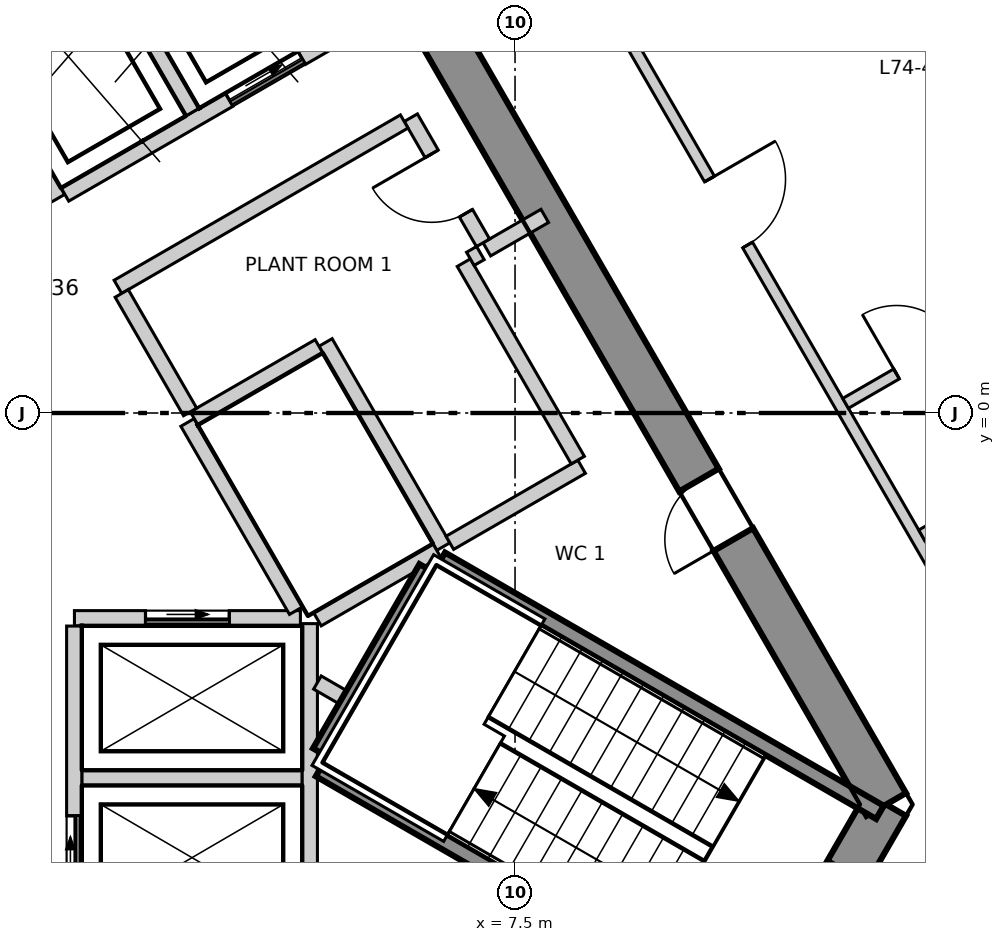
"""IFC4 building model, lengths in metres.
Left out: names, types, materials, properties, quantities, classifications, styles, units other than length and angle.
Written with IfcOpenShell. Run it as: python <this file> out.ifc"""

import sys

from ifc_helpers import new_model, si_unit, direction, frame, frame_2d, origin, place, context, subcontext, project, spatial, polyline, rectangle, outline, extrude, element, fill, save


model = new_model("IFC4")
c1 = context("Model", 3, precision=1e-05, world=origin(), true_north=direction((0.0, 1.0)))
c2 = subcontext(c1, "Body", "Model", "MODEL_VIEW")
j1 = project(units=[si_unit("LENGTHUNIT", "METRE"), si_unit("PLANEANGLEUNIT", "RADIAN")], contexts=[c1])
p1 = place(None, origin())
s1 = spatial("IfcSite", under=j1, at=p1, CompositionType="ELEMENT")
p2 = place(p1, origin())
s2 = spatial("IfcBuilding", under=s1, at=p2, CompositionType="ELEMENT")
p3 = place(p2, frame((0.0, 0.0, 311.5)))
s3 = spatial("IfcBuildingStorey", under=s2, at=p3, CompositionType="ELEMENT", Elevation=311.5)
p4 = place(p3, frame((10.652, -8.15, -0.3), z_axis=(0.0, 0.0, 1.0), x_axis=(0.49997462182, 0.866040055388, 0.0)))
e1 = element("IfcWall", 1, at=p4, inside=s3, PredefinedType="SHEAR", context=c2, shape_type="SweptSolid", body=[
    extrude(outline(polyline([(-0.173, -0.3), (1.732, -0.301), (3.638, -0.301), (3.291, 0.3), (1.732, 0.3), (0.173, 0.3), (-0.173, -0.3)])), origin(), (0.0, 0.0, 1.0), 3.6),
])
p5 = place(p4, frame((1.032, 0.0, 0.3)))
e2 = element("IfcOpeningElement", 2, at=p5, cuts=e1, PredefinedType="OPENING", context=c2, shape_type="SweptSolid", body=[
    extrude(rectangle(XDim=1.4, YDim=2.1, at=frame_2d((0.7, 1.05))), frame((0.0, 0.31, 0.0), z_axis=(0.0, -1.0, 0.0), x_axis=(1.0, 0.0, 0.0)), (0.0, 0.0, 1.0), 0.621),
])
p6 = place(p3, frame((12.384, -5.15, -0.3), z_axis=(0.0, 0.0, 1.0), x_axis=(-0.500000539815, 0.866025092122, 0.0)))
e3 = element("IfcWall", 3, at=p6, inside=s3, PredefinedType="SHEAR", context=c2, shape_type="SweptSolid", body=[
    extrude(outline(polyline([(-0.173, -0.301), (1.795, -0.301), (3.763, -0.301), (5.731, -0.301), (7.7, -0.301), (9.668, -0.301), (11.636, -0.301), (13.604, -0.3), (15.573, -0.3), (17.541, -0.3), (19.509, -0.3), (21.477, -0.3), (21.131, 0.3), (19.226, 0.3), (17.321, 0.3), (15.415, 0.3), (13.51, 0.3), (11.605, 0.3), (9.699, 0.3), (7.794, 0.3), (5.889, 0.3), (3.984, 0.3), (2.078, 0.3), (0.173, 0.3), (-0.173, -0.301)])), origin(), (0.0, 0.0, 1.0), 3.6),
])
p7 = place(p6, frame((16.378, 0.0, 0.3)))
e4 = element("IfcOpeningElement", 4, at=p7, cuts=e3, PredefinedType="OPENING", context=c2, shape_type="SweptSolid", body=[
    extrude(rectangle(XDim=0.9, YDim=2.1, at=frame_2d((0.45, 1.05))), frame((0.0, 0.31, 0.0), z_axis=(0.0, -1.0, 0.0), x_axis=(1.0, 0.0, 0.0)), (0.0, 0.0, 1.0), 0.621),
])
p8 = place(p6, frame((4.026, 0.0, 0.3)))
e5 = element("IfcOpeningElement", 5, at=p8, cuts=e3, PredefinedType="OPENING", context=c2, shape_type="SweptSolid", body=[
    extrude(rectangle(XDim=0.9, YDim=2.1, at=frame_2d((0.45, 1.05))), frame((0.0, 0.31, 0.0), z_axis=(0.0, -1.0, 0.0), x_axis=(1.0, 0.0, 0.0)), (0.0, 0.0, 1.0), 0.621),
])
p9 = place(p3, frame((24.544, -11.385, 0.0), z_axis=(0.0, 0.0, 1.0), x_axis=(-0.500002044679, 0.866024223285, 0.0)))
e6 = element("IfcWall", 6, at=p9, inside=s3, PredefinedType="ELEMENTEDWALL", context=c2, shape_type="SweptSolid", body=[
    extrude(rectangle(XDim=44.243, YDim=0.2, at=frame_2d((22.122, 0.0))), origin(), (0.0, 0.0, 1.0), 3.3),
])
p10 = place(p9, frame((2.056, 0.0, 0.9)))
e7 = element("IfcOpeningElement", 7, at=p10, cuts=e6, PredefinedType="OPENING", context=c2, shape_type="SweptSolid", body=[
    extrude(rectangle(XDim=3.7, YDim=2.2, at=frame_2d((1.85, 1.1))), frame((0.0, 0.11, 0.0), z_axis=(0.0, -1.0, 0.0), x_axis=(1.0, 0.0, 0.0)), (0.0, 0.0, 1.0), 0.22),
])
p11 = place(p9, frame((7.264, 0.0, 0.9)))
e8 = element("IfcOpeningElement", 8, at=p11, cuts=e6, PredefinedType="OPENING", context=c2, shape_type="SweptSolid", body=[
    extrude(rectangle(XDim=3.7, YDim=2.2, at=frame_2d((1.85, 1.1))), frame((0.0, 0.11, 0.0), z_axis=(0.0, -1.0, 0.0), x_axis=(1.0, 0.0, 0.0)), (0.0, 0.0, 1.0), 0.22),
])
p12 = place(p9, frame((12.471, 0.0, 0.9)))
e9 = element("IfcOpeningElement", 9, at=p12, cuts=e6, PredefinedType="OPENING", context=c2, shape_type="SweptSolid", body=[
    extrude(rectangle(XDim=3.7, YDim=2.2, at=frame_2d((1.85, 1.1))), frame((0.0, 0.11, 0.0), z_axis=(0.0, -1.0, 0.0), x_axis=(1.0, 0.0, 0.0)), (0.0, 0.0, 1.0), 0.22),
])
p13 = place(p9, frame((17.678, 0.0, 0.9)))
e10 = element("IfcOpeningElement", 10, at=p13, cuts=e6, PredefinedType="OPENING", context=c2, shape_type="SweptSolid", body=[
    extrude(rectangle(XDim=3.7, YDim=2.2, at=frame_2d((1.85, 1.1))), frame((0.0, 0.11, 0.0), z_axis=(0.0, -1.0, 0.0), x_axis=(1.0, 0.0, 0.0)), (0.0, 0.0, 1.0), 0.22),
])
p14 = place(p9, frame((22.885, 0.0, 0.9)))
e11 = element("IfcOpeningElement", 11, at=p14, cuts=e6, PredefinedType="OPENING", context=c2, shape_type="SweptSolid", body=[
    extrude(rectangle(XDim=3.7, YDim=2.2, at=frame_2d((1.85, 1.1))), frame((0.0, 0.11, 0.0), z_axis=(0.0, -1.0, 0.0), x_axis=(1.0, 0.0, 0.0)), (0.0, 0.0, 1.0), 0.22),
])
p15 = place(p9, frame((28.093, 0.0, 0.9)))
e12 = element("IfcOpeningElement", 12, at=p15, cuts=e6, PredefinedType="OPENING", context=c2, shape_type="SweptSolid", body=[
    extrude(rectangle(XDim=3.7, YDim=2.2, at=frame_2d((1.85, 1.1))), frame((0.0, 0.11, 0.0), z_axis=(0.0, -1.0, 0.0), x_axis=(1.0, 0.0, 0.0)), (0.0, 0.0, 1.0), 0.22),
])
p16 = place(p9, frame((33.3, 0.0, 0.9)))
e13 = element("IfcOpeningElement", 13, at=p16, cuts=e6, PredefinedType="OPENING", context=c2, shape_type="SweptSolid", body=[
    extrude(rectangle(XDim=3.7, YDim=2.2, at=frame_2d((1.85, 1.1))), frame((0.0, 0.11, 0.0), z_axis=(0.0, -1.0, 0.0), x_axis=(1.0, 0.0, 0.0)), (0.0, 0.0, 1.0), 0.22),
])
p17 = place(p9, frame((38.507, 0.0, 0.9)))
e14 = element("IfcOpeningElement", 14, at=p17, cuts=e6, PredefinedType="OPENING", context=c2, shape_type="SweptSolid", body=[
    extrude(rectangle(XDim=3.7, YDim=2.2, at=frame_2d((1.85, 1.1))), frame((0.0, 0.11, 0.0), z_axis=(0.0, -1.0, 0.0), x_axis=(1.0, 0.0, 0.0)), (0.0, 0.0, 1.0), 0.22),
])
p18 = place(p3, frame((0.075, 20.37, 0.0), z_axis=(0.0, 0.0, 1.0), x_axis=(0.500006672087, -0.866021551619, 0.0)))
e15 = element("IfcWall", 15, at=p18, inside=s3, PredefinedType="PARTITIONING", context=c2, shape_type="SweptSolid", body=[
    extrude(rectangle(XDim=35.27, YDim=0.15, at=frame_2d((17.635, 0.0))), origin(), (0.0, 0.0, 1.0), 3.3),
])
p19 = place(p18, frame((31.206, 0.0, 0.0)))
e16 = element("IfcOpeningElement", 16, at=p19, cuts=e15, PredefinedType="OPENING", context=c2, shape_type="SweptSolid", body=[
    extrude(rectangle(XDim=1.0, YDim=2.1, at=frame_2d((0.5, 1.05))), frame((0.0, 0.085, 0.0), z_axis=(0.0, -1.0, 0.0), x_axis=(1.0, 0.0, 0.0)), (0.0, 0.0, 1.0), 0.17),
])
p20 = place(p18, frame((19.968, 0.0, 0.0)))
e17 = element("IfcOpeningElement", 17, at=p20, cuts=e15, PredefinedType="OPENING", context=c2, shape_type="SweptSolid", body=[
    extrude(rectangle(XDim=1.0, YDim=2.1, at=frame_2d((0.5, 1.05))), frame((0.0, 0.085, 0.0), z_axis=(0.0, -1.0, 0.0), x_axis=(1.0, 0.0, 0.0)), (0.0, 0.0, 1.0), 0.17),
])
p21 = place(p18, frame((13.353, 0.0, 0.0)))
e18 = element("IfcOpeningElement", 18, at=p21, cuts=e15, PredefinedType="OPENING", context=c2, shape_type="SweptSolid", body=[
    extrude(rectangle(XDim=1.0, YDim=2.1, at=frame_2d((0.5, 1.05))), frame((0.0, 0.085, 0.0), z_axis=(0.0, -1.0, 0.0), x_axis=(1.0, 0.0, 0.0)), (0.0, 0.0, 1.0), 0.17),
])
p22 = place(p18, frame((7.746, 0.0, 0.0)))
e19 = element("IfcOpeningElement", 19, at=p22, cuts=e15, PredefinedType="OPENING", context=c2, shape_type="SweptSolid", body=[
    extrude(rectangle(XDim=1.0, YDim=2.1, at=frame_2d((0.5, 1.05))), frame((0.0, 0.085, 0.0), z_axis=(0.0, -1.0, 0.0), x_axis=(1.0, 0.0, 0.0)), (0.0, 0.0, 1.0), 0.17),
])
p23 = place(p18, frame((3.038, 0.0, 0.0)))
e20 = element("IfcOpeningElement", 20, at=p23, cuts=e15, PredefinedType="OPENING", context=c2, shape_type="SweptSolid", body=[
    extrude(rectangle(XDim=1.0, YDim=2.1, at=frame_2d((0.5, 1.05))), frame((0.0, 0.085, 0.0), z_axis=(0.0, -1.0, 0.0), x_axis=(1.0, 0.0, 0.0)), (0.0, 0.0, 1.0), 0.17),
])
p24 = place(p3, frame((11.849, 0.127, 0.0), z_axis=(0.0, 0.0, 1.0), x_axis=(0.866014668023, 0.500018594424, 0.0)))
e21 = element("IfcWall", 21, at=p24, inside=s3, PredefinedType="PARTITIONING", context=c2, shape_type="SweptSolid", body=[
    extrude(rectangle(XDim=2.45, YDim=0.15, at=frame_2d((1.225, 0.0))), origin(), (0.0, 0.0, 1.0), 3.3),
])
p25 = place(p24, frame((0.775, 0.0, 0.0)))
e22 = element("IfcOpeningElement", 22, at=p25, cuts=e21, PredefinedType="OPENING", context=c2, shape_type="SweptSolid", body=[
    extrude(rectangle(XDim=0.9, YDim=2.1, at=frame_2d((0.45, 1.05))), frame((0.0, 0.085, 0.0), z_axis=(0.0, -1.0, 0.0), x_axis=(1.0, 0.0, 0.0)), (0.0, 0.0, 1.0), 0.17),
])
p26 = place(p3, frame((12.849, -1.605, 0.0), z_axis=(0.0, 0.0, 1.0), x_axis=(0.866101252082, 0.499868603878, 0.0)))
e23 = element("IfcWall", 23, at=p26, inside=s3, PredefinedType="PARTITIONING", context=c2, shape_type="SweptSolid", body=[
    extrude(rectangle(XDim=2.507, YDim=0.15, at=frame_2d((1.253, 0.0))), origin(), (0.0, 0.0, 1.0), 3.3),
])
p27 = place(p3, frame((1.8, -4.8, 0.0), z_axis=(0.0, 0.0, 1.0), x_axis=(1.0, 0.0, 0.0)))
e24 = element("IfcWall", 24, at=p27, inside=s3, PredefinedType="SOLIDWALL", context=c2, shape_type="SweptSolid", body=[
    extrude(rectangle(XDim=2.9, YDim=0.2, at=frame_2d((1.45, 0.0))), origin(), (0.0, 0.0, 1.0), 3.3),
])
p28 = place(p3, frame((1.703, -2.7, 0.0), z_axis=(0.0, 0.0, 1.0), x_axis=(1.0, 0.0, 0.0)))
e25 = element("IfcWall", 25, at=p28, inside=s3, PredefinedType="SOLIDWALL", context=c2, shape_type="SweptSolid", body=[
    extrude(rectangle(XDim=2.973, YDim=0.2, at=frame_2d((1.487, 0.0))), origin(), (0.0, 0.0, 1.0), 3.3),
])
p29 = place(p28, frame((0.936, 0.0, 0.0)))
e26 = element("IfcOpeningElement", 26, at=p29, cuts=e25, PredefinedType="OPENING", context=c2, shape_type="SweptSolid", body=[
    extrude(rectangle(XDim=1.1, YDim=2.1, at=frame_2d((0.55, 1.05))), frame((0.0, 0.11, 0.0), z_axis=(0.0, -1.0, 0.0), x_axis=(1.0, 0.0, 0.0)), (0.0, 0.0, 1.0), 0.22),
])
p30 = place(p3, frame((0.0, 5.4, 0.0), z_axis=(0.0, 0.0, 1.0), x_axis=(0.500103862429, -0.865965430478, 0.0)))
e27 = element("IfcWall", 27, at=p30, inside=s3, PredefinedType="SOLIDWALL", context=c2, shape_type="SweptSolid", body=[
    extrude(rectangle(XDim=2.973, YDim=0.2, at=frame_2d((1.487, 0.0))), origin(), (0.0, 0.0, 1.0), 3.3),
])
p31 = place(p30, frame((0.937, 0.0, 0.0)))
e28 = element("IfcOpeningElement", 28, at=p31, cuts=e27, PredefinedType="OPENING", context=c2, shape_type="SweptSolid", body=[
    extrude(rectangle(XDim=1.1, YDim=2.1, at=frame_2d((0.55, 1.05))), frame((0.0, 0.11, 0.0), z_axis=(0.0, -1.0, 0.0), x_axis=(1.0, 0.0, 0.0)), (0.0, 0.0, 1.0), 0.22),
])
p32 = place(p3, frame((3.19, -0.125, 0.0), z_axis=(0.0, 0.0, 1.0), x_axis=(0.499988658015, -0.866031951983, 0.0)))
e29 = element("IfcWall", 29, at=p32, inside=s3, PredefinedType="SOLIDWALL", context=c2, shape_type="SweptSolid", body=[
    extrude(rectangle(XDim=2.858, YDim=0.2, at=frame_2d((1.429, 0.0))), origin(), (0.0, 0.0, 1.0), 3.3),
])
p33 = place(p3, frame((1.578, 2.874, 0.0), z_axis=(0.0, 0.0, 1.0), x_axis=(0.866045911672, 0.499964477614, 0.0)))
e30 = element("IfcWall", 30, at=p33, inside=s3, PredefinedType="SOLIDWALL", context=c2, shape_type="SweptSolid", body=[
    extrude(rectangle(XDim=5.327, YDim=0.2, at=frame_2d((2.663, 0.0))), origin(), (0.0, 0.0, 1.0), 3.3),
])
p34 = place(p33, frame((2.496, 0.0, 0.0)))
e31 = element("IfcOpeningElement", 31, at=p34, cuts=e30, PredefinedType="OPENING", context=c2, shape_type="SweptSolid", body=[
    extrude(rectangle(XDim=1.1, YDim=2.1, at=frame_2d((0.55, 1.05))), frame((0.0, 0.11, 0.0), z_axis=(0.0, -1.0, 0.0), x_axis=(1.0, 0.0, 0.0)), (0.0, 0.0, 1.0), 0.22),
])
p35 = place(p3, frame((1.7, -8.13, 0.0), z_axis=(0.0, 0.0, 1.0), x_axis=(0.0, 1.0, 0.0)))
e32 = element("IfcWall", 32, at=p35, inside=s3, PredefinedType="SOLIDWALL", context=c2, shape_type="SweptSolid", body=[
    extrude(rectangle(XDim=5.327, YDim=0.2, at=frame_2d((2.664, 0.0))), origin(), (0.0, 0.0, 1.0), 3.3),
])
p36 = place(p35, frame((1.73, 0.0, 0.0)))
e33 = element("IfcOpeningElement", 33, at=p36, cuts=e32, PredefinedType="OPENING", context=c2, shape_type="SweptSolid", body=[
    extrude(rectangle(XDim=1.1, YDim=2.1, at=frame_2d((0.55, 1.05))), frame((0.0, 0.11, 0.0), z_axis=(0.0, -1.0, 0.0), x_axis=(1.0, 0.0, 0.0)), (0.0, 0.0, 1.0), 0.22),
])
p37 = place(p3, frame((4.8, -6.8, 0.0), z_axis=(0.0, 0.0, 1.0), x_axis=(0.0, 1.0, 0.0)))
e34 = element("IfcWall", 34, at=p37, inside=s3, PredefinedType="SOLIDWALL", context=c2, shape_type="SweptSolid", body=[
    extrude(rectangle(XDim=4.029, YDim=0.2, at=frame_2d((2.015, 0.0))), origin(), (0.0, 0.0, 1.0), 3.3),
])
p38 = place(p3, frame((1.807, 6.47, 0.0), z_axis=(0.0, 0.0, 1.0), x_axis=(0.50012328804, -0.865954211699, 0.0)))
e35 = element("IfcWall", 35, at=p38, inside=s3, PredefinedType="SOLIDWALL", context=c2, shape_type="SweptSolid", body=[
    extrude(rectangle(XDim=2.9, YDim=0.2, at=frame_2d((1.45, 0.0))), origin(), (0.0, 0.0, 1.0), 3.3),
])
p39 = place(p3, frame((5.007, 0.928, 0.0), z_axis=(0.0, 0.0, 1.0), x_axis=(0.499899694197, -0.866083307622, 0.0)))
e36 = element("IfcWall", 36, at=p39, inside=s3, PredefinedType="SOLIDWALL", context=c2, shape_type="SweptSolid", body=[
    extrude(rectangle(XDim=3.1, YDim=0.2, at=frame_2d((1.55, 0.0))), origin(), (0.0, 0.0, 1.0), 3.3),
])
p40 = place(p3, frame((3.278, -0.071, 0.0), z_axis=(0.0, 0.0, 1.0), x_axis=(0.865784509405, 0.500417009377, 0.0)))
e37 = element("IfcWall", 37, at=p40, inside=s3, PredefinedType="SOLIDWALL", context=c2, shape_type="SweptSolid", body=[
    extrude(rectangle(XDim=1.896, YDim=0.2, at=frame_2d((0.948, 0.0))), origin(), (0.0, 0.0, 1.0), 3.3),
])
p41 = place(p3, frame((7.129, 2.153, 0.0), z_axis=(0.0, 0.0, 1.0), x_axis=(0.866083962871, 0.499898558967, 0.0)))
e38 = element("IfcWall", 38, at=p41, inside=s3, PredefinedType="SOLIDWALL", context=c2, shape_type="SweptSolid", body=[
    extrude(rectangle(XDim=0.88, YDim=0.2, at=frame_2d((0.44, 0.0))), origin(), (0.0, 0.0, 1.0), 3.3),
])
p42 = place(p3, frame((6.129, 3.885, 0.0), z_axis=(0.0, 0.0, 1.0), x_axis=(0.499952260202, -0.866052964615, 0.0)))
e39 = element("IfcWall", 39, at=p42, inside=s3, PredefinedType="SOLIDWALL", context=c2, shape_type="SweptSolid", body=[
    extrude(rectangle(XDim=1.901, YDim=0.2, at=frame_2d((0.95, 0.0))), origin(), (0.0, 0.0, 1.0), 3.3),
])
p43 = place(p42, frame((0.55, 0.0, 0.0)))
e40 = element("IfcOpeningElement", 40, at=p43, cuts=e39, PredefinedType="OPENING", context=c2, shape_type="SweptSolid", body=[
    extrude(rectangle(XDim=0.9, YDim=2.1, at=frame_2d((0.45, 1.05))), frame((0.0, 0.11, 0.0), z_axis=(0.0, -1.0, 0.0), x_axis=(1.0, 0.0, 0.0)), (0.0, 0.0, 1.0), 0.22),
])
p44 = place(p3, frame((2.275, 1.66, 0.0), z_axis=(0.0, 0.0, 1.0), x_axis=(0.866013608182, 0.500020430026, 0.0)))
e41 = element("IfcWall", 41, at=p44, inside=s3, PredefinedType="SOLIDWALL", context=c2, shape_type="SweptSolid", body=[
    extrude(rectangle(XDim=4.35, YDim=0.2, at=frame_2d((2.175, 0.0))), origin(), (0.0, 0.0, 1.0), 3.3),
])
p45 = place(p3, frame((2.325, 1.573, 0.0), z_axis=(0.0, 0.0, 1.0), x_axis=(0.500004188491, -0.866022985545, 0.0)))
e42 = element("IfcWall", 42, at=p45, inside=s3, PredefinedType="SOLIDWALL", context=c2, shape_type="SweptSolid", body=[
    extrude(rectangle(XDim=1.8, YDim=0.2, at=frame_2d((0.9, 0.0))), origin(), (0.0, 0.0, 1.0), 3.3),
])
p46 = place(p3, frame((4.9, -2.714, 0.0), z_axis=(0.0, 0.0, 1.0), x_axis=(0.865846928409, 0.500309001083, 0.0)))
e43 = element("IfcWall", 43, at=p46, inside=s3, PredefinedType="SOLIDWALL", context=c2, shape_type="SweptSolid", body=[
    extrude(rectangle(XDim=1.813, YDim=0.2, at=frame_2d((0.907, 0.0))), origin(), (0.0, 0.0, 1.0), 3.3),
])
p47 = place(p3, frame((4.9, -3.546, 0.0), z_axis=(0.0, 0.0, 1.0), x_axis=(0.865527936036, -0.500860651221, 0.0)))
e44 = element("IfcWall", 44, at=p47, inside=s3, PredefinedType="SOLIDWALL", context=c2, shape_type="SweptSolid", body=[
    extrude(rectangle(XDim=0.384, YDim=0.2, at=frame_2d((0.192, 0.0))), origin(), (0.0, 0.0, 1.0), 3.3),
])
p48 = place(p3, frame((6.642, -1.708, 0.0), z_axis=(0.0, 0.0, 1.0), x_axis=(0.866043441391, 0.499968756647, 0.0)))
e45 = element("IfcWall", 45, at=p48, inside=s3, PredefinedType="SOLIDWALL", context=c2, shape_type="SweptSolid", body=[
    extrude(rectangle(XDim=2.002, YDim=0.2, at=frame_2d((1.001, 0.0))), origin(), (0.0, 0.0, 1.0), 3.3),
])
p49 = place(p3, frame((6.826, 1.978, 0.0), z_axis=(0.0, 0.0, 1.0), x_axis=(0.499990139034, -0.866031096941, 0.0)))
e46 = element("IfcWall", 46, at=p49, inside=s3, PredefinedType="SOLIDWALL", context=c2, shape_type="SweptSolid", body=[
    extrude(rectangle(XDim=3.0, YDim=0.2, at=frame_2d((1.5, 0.0))), origin(), (0.0, 0.0, 1.0), 3.3),
])
p50 = place(p3, frame((6.912, 2.028, 0.0), z_axis=(0.0, 0.0, 1.0), x_axis=(0.866559367082, 0.499074005857, 0.0)))
e47 = element("IfcWall", 47, at=p50, inside=s3, PredefinedType="SOLIDWALL", context=c2, shape_type="SweptSolid", body=[
    extrude(rectangle(XDim=0.152, YDim=0.2, at=frame_2d((0.076, 0.0))), origin(), (0.0, 0.0, 1.0), 3.3),
])
p51 = place(p3, frame((4.929, -4.462, 0.0), z_axis=(0.0, 0.0, 1.0), x_axis=(0.500200581029, 0.865909567298, 0.0)))
e48 = element("IfcWall", 48, at=p51, inside=s3, PredefinedType="SOLIDWALL", context=c2, shape_type="SweptSolid", body=[
    extrude(rectangle(XDim=2.799, YDim=0.2, at=frame_2d((1.399, 0.0))), origin(), (0.0, 0.0, 1.0), 3.3),
])
p52 = place(p3, frame((6.529, -1.922, 0.0), z_axis=(0.0, 0.0, 1.0), x_axis=(0.866068467981, -0.499925403204, 0.0)))
e49 = element("IfcWall", 49, at=p52, inside=s3, PredefinedType="SOLIDWALL", context=c2, shape_type="SweptSolid", body=[
    extrude(rectangle(XDim=6.665, YDim=0.2, at=frame_2d((3.332, 0.0))), origin(), (0.0, 0.0, 1.0), 3.3),
])
p53 = place(p3, frame((4.929, -4.693, 0.0), z_axis=(0.0, 0.0, 1.0), x_axis=(0.866005022404, -0.500035299925, 0.0)))
e50 = element("IfcWall", 50, at=p53, inside=s3, PredefinedType="SOLIDWALL", context=c2, shape_type="SweptSolid", body=[
    extrude(rectangle(XDim=6.665, YDim=0.2, at=frame_2d((3.333, 0.0))), origin(), (0.0, 0.0, 1.0), 3.3),
])
p54 = place(p29, origin())
e51 = element("IfcDoor", 51, at=p54, inside=s3, OperationType="SLIDING_TO_LEFT", PredefinedType="DOOR", context=c2, shape_type="SweptSolid", body=[
    extrude(rectangle(XDim=1.1, YDim=2.1, at=frame_2d((0.55, 1.05))), frame((0.0, 0.025, 0.0), z_axis=(0.0, -1.0, 0.0), x_axis=(1.0, 0.0, 0.0)), (0.0, 0.0, 1.0), 0.05),
])
fill(e26, e51)
p55 = place(p36, origin())
e52 = element("IfcDoor", 52, at=p55, inside=s3, OperationType="SLIDING_TO_LEFT", PredefinedType="DOOR", context=c2, shape_type="SweptSolid", body=[
    extrude(rectangle(XDim=1.1, YDim=2.1, at=frame_2d((0.55, 1.05))), frame((0.0, 0.025, 0.0), z_axis=(0.0, -1.0, 0.0), x_axis=(1.0, 0.0, 0.0)), (0.0, 0.0, 1.0), 0.05),
])
fill(e33, e52)
p56 = place(p34, origin())
e53 = element("IfcDoor", 53, at=p56, inside=s3, OperationType="SLIDING_TO_LEFT", PredefinedType="DOOR", context=c2, shape_type="SweptSolid", body=[
    extrude(rectangle(XDim=1.1, YDim=2.1, at=frame_2d((0.55, 1.05))), frame((0.0, 0.025, 0.0), z_axis=(0.0, -1.0, 0.0), x_axis=(1.0, 0.0, 0.0)), (0.0, 0.0, 1.0), 0.05),
])
fill(e31, e53)
p57 = place(p20, origin())
e54 = element("IfcDoor", 54, at=p57, inside=s3, OperationType="SINGLE_SWING_RIGHT", PredefinedType="DOOR", context=c2, shape_type="SweptSolid", body=[
    extrude(rectangle(XDim=1.0, YDim=2.1, at=frame_2d((0.5, 1.05))), frame((0.0, 0.025, 0.0), z_axis=(0.0, -1.0, 0.0), x_axis=(1.0, 0.0, 0.0)), (0.0, 0.0, 1.0), 0.05),
])
fill(e17, e54)
p58 = place(p25, origin())
e55 = element("IfcDoor", 55, at=p58, inside=s3, OperationType="SINGLE_SWING_RIGHT", PredefinedType="DOOR", context=c2, shape_type="SweptSolid", body=[
    extrude(rectangle(XDim=0.9, YDim=2.1, at=frame_2d((0.45, 1.05))), frame((0.0, 0.025, 0.0), z_axis=(0.0, -1.0, 0.0), x_axis=(1.0, 0.0, 0.0)), (0.0, 0.0, 1.0), 0.05),
])
fill(e22, e55)
p59 = place(p8, origin())
e56 = element("IfcDoor", 56, at=p59, inside=s3, OperationType="SINGLE_SWING_RIGHT", PredefinedType="DOOR", context=c2, shape_type="SweptSolid", body=[
    extrude(rectangle(XDim=0.9, YDim=2.1, at=frame_2d((0.45, 1.05))), frame((0.0, 0.025, 0.0), z_axis=(0.0, -1.0, 0.0), x_axis=(1.0, 0.0, 0.0)), (0.0, 0.0, 1.0), 0.05),
])
fill(e5, e56)
p60 = place(p43, origin())
e57 = element("IfcDoor", 57, at=p60, inside=s3, OperationType="SINGLE_SWING_LEFT", PredefinedType="DOOR", context=c2, shape_type="SweptSolid", body=[
    extrude(rectangle(XDim=0.9, YDim=2.1, at=frame_2d((0.45, 1.05))), frame((0.0, 0.025, 0.0), z_axis=(0.0, -1.0, 0.0), x_axis=(1.0, 0.0, 0.0)), (0.0, 0.0, 1.0), 0.05),
])
fill(e40, e57)
save(model, sys.argv[1])
